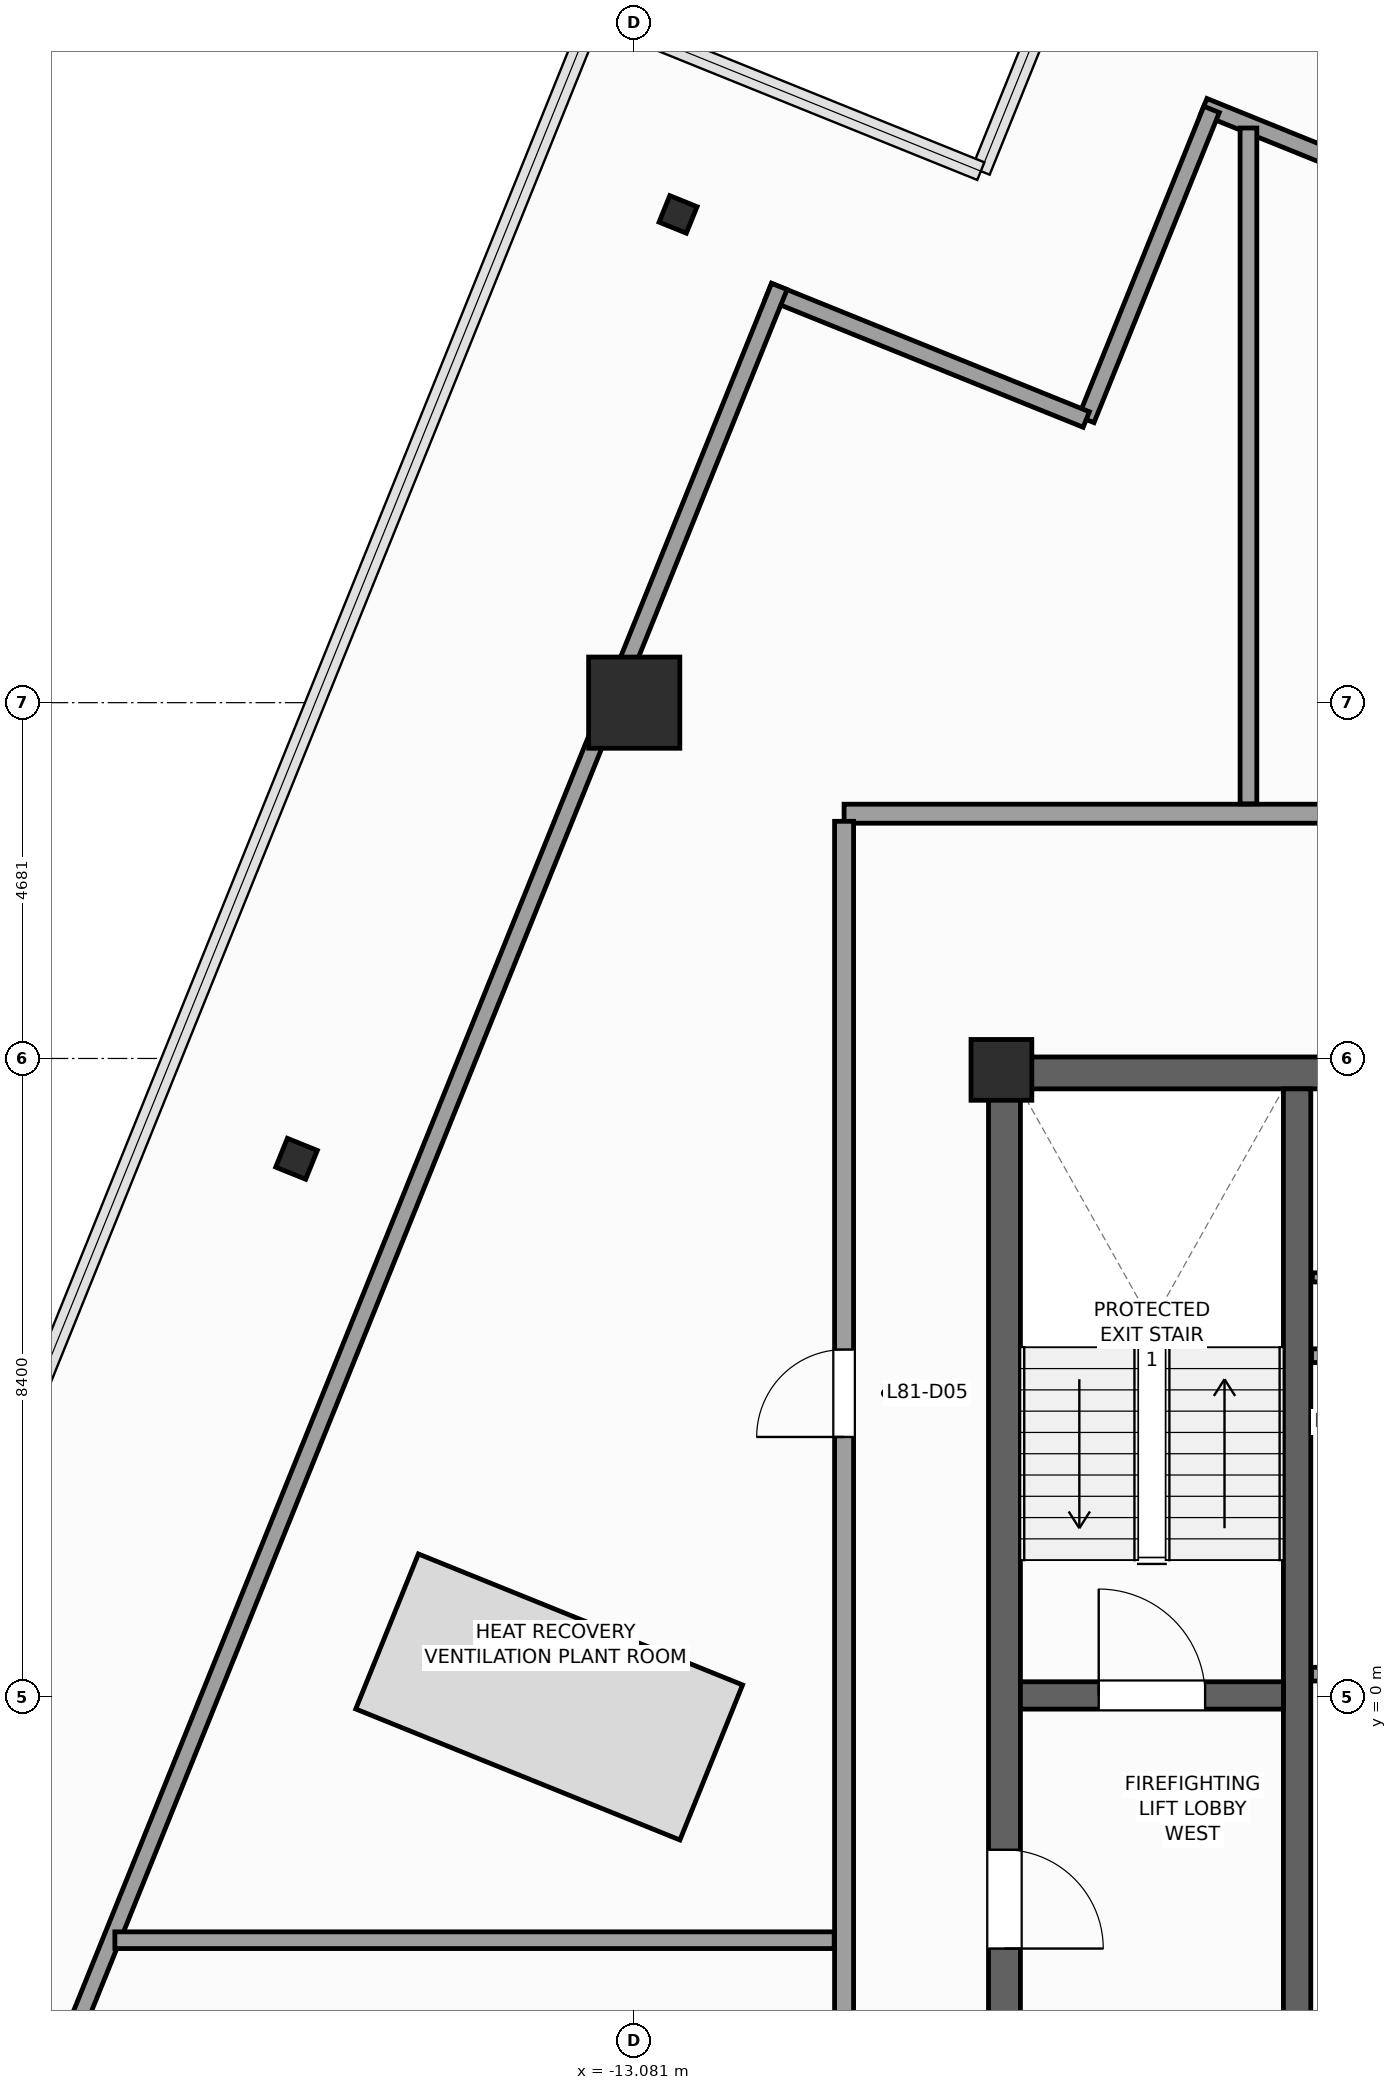
"""IFC4 building model, lengths in metres.
Left out: names, types, materials, properties, quantities, classifications, styles, units other than length and angle.
Written with IfcOpenShell. Run it as: python <this file> out.ifc"""

import sys

from ifc_helpers import new_model, si_unit, direction, frame, frame_2d, origin, origin_2d, place, context, subcontext, project, spatial, rectangle, i_section, extrude, source, transform, mapped, element, fill, save


model = new_model("IFC4")
c1 = context("Model", 3, precision=1e-05, world=origin(), true_north=direction((0.0, 1.0)))
c2 = subcontext(c1, "Body", "Model", "MODEL_VIEW")
j1 = project(units=[si_unit("LENGTHUNIT", "METRE"), si_unit("PLANEANGLEUNIT", "RADIAN")], contexts=[c1])
p1 = place(None, origin())
s1 = spatial("IfcSite", under=j1, at=p1, CompositionType="ELEMENT")
p2 = place(p1, origin())
s2 = spatial("IfcBuilding", under=s1, at=p2, CompositionType="ELEMENT")
p3 = place(p2, frame((0.0, 0.0, 329.6)))
s3 = spatial("IfcBuildingStorey", under=s2, at=p3, CompositionType="ELEMENT", Elevation=329.6)
p4 = place(p3, frame((-8.42, 8.21, 0.0), z_axis=(0.0, 0.0, 1.0), x_axis=(1.0, 0.0, 0.0)))
e1 = element("IfcWall", 1, at=p4, inside=s3, PredefinedType="SHEAR", context=c2, shape_type="SweptSolid", body=[
    extrude(rectangle(XDim=16.84, YDim=0.42, at=frame_2d((8.42, 0.0))), origin(), (0.0, 0.0, 1.0), 4.0),
])
p5 = place(p3, frame((-8.21, -8.0, 0.0), z_axis=(0.0, 0.0, 1.0), x_axis=(0.0, 1.0, 0.0)))
e2 = element("IfcWall", 2, at=p5, inside=s3, PredefinedType="SHEAR", context=c2, shape_type="SweptSolid", body=[
    extrude(rectangle(XDim=16.0, YDim=0.42, at=frame_2d((8.0, 0.0))), origin(), (0.0, 0.0, 1.0), 4.0),
])
p6 = place(p5, frame((4.69, 0.0, 0.0)))
e3 = element("IfcOpeningElement", 3, at=p6, cuts=e2, PredefinedType="OPENING", context=c2, shape_type="SweptSolid", body=[
    extrude(rectangle(XDim=1.3, YDim=2.2, at=frame_2d((0.65, 1.1))), frame((0.0, 0.22, 0.0), z_axis=(0.0, -1.0, 0.0), x_axis=(1.0, 0.0, 0.0)), (0.0, 0.0, 1.0), 0.44),
])
p7 = place(p3, frame((-4.36, -8.0, 0.0), z_axis=(0.0, 0.0, 1.0), x_axis=(0.0, 1.0, 0.0)))
e4 = element("IfcWall", 4, at=p7, inside=s3, PredefinedType="SHEAR", context=c2, shape_type="SweptSolid", body=[
    extrude(rectangle(XDim=16.0, YDim=0.36, at=frame_2d((8.0, 0.0))), origin(), (0.0, 0.0, 1.0), 4.0),
])
p8 = place(p3, frame((-8.0, 0.02, 0.0), z_axis=(0.0, 0.0, 1.0), x_axis=(1.0, 0.0, 0.0)))
e5 = element("IfcWall", 5, at=p8, inside=s3, PredefinedType="SHEAR", context=c2, shape_type="SweptSolid", body=[
    extrude(rectangle(XDim=3.46, YDim=0.36, at=frame_2d((1.73, 0.0))), origin(), (0.0, 0.0, 1.0), 4.0),
])
p9 = place(p8, frame((1.03, 0.0, 0.0)))
e6 = element("IfcOpeningElement", 6, at=p9, cuts=e5, PredefinedType="OPENING", context=c2, shape_type="SweptSolid", body=[
    extrude(rectangle(XDim=1.4, YDim=2.2, at=frame_2d((0.7, 1.1))), frame((0.0, 0.19, 0.0), z_axis=(0.0, -1.0, 0.0), x_axis=(1.0, 0.0, 0.0)), (0.0, 0.0, 1.0), 0.38),
])
m1 = source(origin(), c2, "Body", "SweptSolid", [
    extrude(rectangle(XDim=0.8, YDim=0.8, at=origin_2d()), origin(), (0.0, 0.0, 1.0), 4.0),
])
p10 = place(p3, frame((-8.25, 8.25, 0.0), z_axis=(0.0, 0.0, 1.0), x_axis=(1.0, 0.0, 0.0)))
e7 = element("IfcColumn", 7, at=p10, inside=s3, PredefinedType="PILASTER", context=c2, shape_type="MappedRepresentation", body=[
    mapped(m1, transform((0.0, 0.0, 0.0), scale=1.0)),
])
m2 = source(origin(), c2, "Body", "SweptSolid", [
    extrude(rectangle(XDim=1.2, YDim=1.2, at=origin_2d()), origin(), (0.0, 0.0, 1.0), 4.0),
])
p11 = place(p3, frame((-13.081, 13.081, 0.0), z_axis=(0.0, 0.0, 1.0), x_axis=(1.0, 0.0, 0.0)))
e8 = element("IfcColumn", 8, at=p11, inside=s3, PredefinedType="COLUMN", context=c2, shape_type="MappedRepresentation", body=[
    mapped(m2, transform((0.0, 0.0, 0.0), scale=1.0)),
])
m3 = source(origin(), c2, "Body", "SweptSolid", [
    extrude(i_section(OverallWidth=0.376, OverallDepth=0.387, WebThickness=0.02, FlangeThickness=0.032, FilletRadius=0.015, at=origin_2d()), origin(), (0.0, 0.0, 1.0), 4.0),
])
p12 = place(p3, frame((-12.504, 19.504, 0.0), z_axis=(0.0, 0.0, 1.0), x_axis=(0.374606593416, 0.927183854567, 0.0)))
e9 = element("IfcColumn", 9, at=p12, inside=s3, PredefinedType="COLUMN", context=c2, shape_type="MappedRepresentation", body=[
    mapped(m3, transform((0.0, 0.0, 0.0), scale=1.0)),
])
m4 = source(origin(), c2, "Body", "SweptSolid", [
    extrude(i_section(OverallWidth=0.409, OverallDepth=0.425, WebThickness=0.024, FlangeThickness=0.039, FilletRadius=0.015, at=origin_2d()), origin(), (0.0, 0.0, 1.0), 4.0),
])
p13 = place(p3, frame((-17.524, 7.08, 0.0), z_axis=(0.0, 0.0, 1.0), x_axis=(0.374606593416, 0.927183854567, 0.0)))
e10 = element("IfcColumn", 10, at=p13, inside=s3, PredefinedType="COLUMN", context=c2, shape_type="MappedRepresentation", body=[
    mapped(m4, transform((0.0, 0.0, 0.0), scale=1.0)),
])
for number, where, z_axis, x_axis in (
    (11, (-4.17, 0.3, 0.0), (0.0, 0.0, 1.0), (1.0, 0.0, 0.0)),
    (12, (-4.17, 4.49, 0.0), (0.0, 0.0, 1.0), (1.0, 0.0, 0.0)),
):
    element("IfcWall", number, at=place(p3, frame(where, z_axis=z_axis, x_axis=x_axis)), inside=s3, PredefinedType="PARTITIONING", context=c2, shape_type="SweptSolid", body=[
        extrude(rectangle(XDim=2.28, YDim=0.18, at=frame_2d((1.14, 0.0))), origin(), (0.0, 0.0, 1.0), 3.7),
    ])
p14 = place(p3, frame((-4.16, 5.52, 0.0), z_axis=(0.0, 0.0, 1.0), x_axis=(1.0, 0.0, 0.0)))
e13 = element("IfcWall", 13, at=p14, inside=s3, PredefinedType="PARTITIONING", context=c2, shape_type="SweptSolid", body=[
    extrude(rectangle(XDim=2.1, YDim=0.12, at=frame_2d((1.05, 0.0))), origin(), (0.0, 0.0, 1.0), 3.7),
])
p15 = place(p3, frame((18.556, 11.172, 0.0), z_axis=(0.0, 0.0, 1.0), x_axis=(-0.927181788521, 0.374611707018, 0.0)))
e14 = element("IfcWall", 14, at=p15, inside=s3, PredefinedType="PARTITIONING", context=c2, shape_type="SweptSolid", body=[
    extrude(rectangle(XDim=26.04, YDim=0.22, at=frame_2d((13.02, 0.0))), origin(), (0.0, 0.0, 1.0), 3.05),
])
p16 = place(p3, frame((-5.486, 20.886, 0.0), z_axis=(0.0, 0.0, 1.0), x_axis=(-0.374593321469, -0.927189216671, 0.0)))
e15 = element("IfcWall", 15, at=p16, inside=s3, PredefinedType="PARTITIONING", context=c2, shape_type="SweptSolid", body=[
    extrude(rectangle(XDim=4.4, YDim=0.22, at=frame_2d((2.2, 0.0))), origin(), (0.0, 0.0, 1.0), 3.7),
])
p17 = place(p3, frame((-7.134, 16.806, 0.0), z_axis=(0.0, 0.0, 1.0), x_axis=(-0.927186885331, 0.374599091925, 0.0)))
e16 = element("IfcWall", 16, at=p17, inside=s3, PredefinedType="PARTITIONING", context=c2, shape_type="SweptSolid", body=[
    extrude(rectangle(XDim=4.51, YDim=0.22, at=frame_2d((2.255, 0.0))), origin(), (0.0, 0.0, 1.0), 3.7),
])
p18 = place(p3, frame((-11.172, 18.556, 0.0), z_axis=(0.0, 0.0, 1.0), x_axis=(-0.374611707018, -0.927181788521, 0.0)))
e17 = element("IfcWall", 17, at=p18, inside=s3, PredefinedType="PARTITIONING", context=c2, shape_type="SweptSolid", body=[
    extrude(rectangle(XDim=26.04, YDim=0.22, at=frame_2d((13.02, 0.0))), origin(), (0.0, 0.0, 1.0), 3.05),
])
p19 = place(p3, frame((-10.32, 11.62, 0.0), z_axis=(0.0, 0.0, 1.0), x_axis=(1.0, 0.0, 0.0)))
e18 = element("IfcWall", 18, at=p19, inside=s3, PredefinedType="PARTITIONING", context=c2, shape_type="SweptSolid", body=[
    extrude(rectangle(XDim=21.94, YDim=0.25, at=frame_2d((10.97, 0.0))), origin(), (0.0, 0.0, 1.0), 3.7),
])
p20 = place(p19, frame((9.745, 0.0, 0.0)))
e19 = element("IfcOpeningElement", 19, at=p20, cuts=e18, PredefinedType="OPENING", context=c2, shape_type="SweptSolid", body=[
    extrude(rectangle(XDim=1.15, YDim=2.25, at=frame_2d((0.575, 1.125))), frame((0.0, 0.135, 0.0), z_axis=(0.0, -1.0, 0.0), x_axis=(1.0, 0.0, 0.0)), (0.0, 0.0, 1.0), 0.27),
])
p21 = place(p3, frame((-10.32, -10.22, 0.0), z_axis=(0.0, 0.0, 1.0), x_axis=(0.0, 1.0, 0.0)))
e20 = element("IfcWall", 20, at=p21, inside=s3, PredefinedType="PARTITIONING", context=c2, shape_type="SweptSolid", body=[
    extrude(rectangle(XDim=21.74, YDim=0.25, at=frame_2d((10.87, 0.0))), origin(), (0.0, 0.0, 1.0), 3.7),
])
p22 = place(p21, frame((13.641, 0.0, 0.0)))
e21 = element("IfcOpeningElement", 21, at=p22, cuts=e20, PredefinedType="OPENING", context=c2, shape_type="SweptSolid", body=[
    extrude(rectangle(XDim=1.15, YDim=2.25, at=frame_2d((0.575, 1.125))), frame((0.0, 0.135, 0.0), z_axis=(0.0, -1.0, 0.0), x_axis=(1.0, 0.0, 0.0)), (0.0, 0.0, 1.0), 0.27),
])
p23 = place(p3, frame((-5.0, 11.75, 0.0), z_axis=(0.0, 0.0, 1.0), x_axis=(0.0, 1.0, 0.0)))
e22 = element("IfcWall", 22, at=p23, inside=s3, PredefinedType="PARTITIONING", context=c2, shape_type="SweptSolid", body=[
    extrude(rectangle(XDim=8.891, YDim=0.22, at=frame_2d((4.446, 0.0))), origin(), (0.0, 0.0, 1.0), 3.7),
])
p24 = place(p3, frame((-10.45, -3.2, 0.0), z_axis=(0.0, 0.0, 1.0), x_axis=(-1.0, 0.0, 0.0)))
e23 = element("IfcWall", 23, at=p24, inside=s3, PredefinedType="PARTITIONING", context=c2, shape_type="SweptSolid", body=[
    extrude(rectangle(XDim=9.464, YDim=0.22, at=frame_2d((4.732, 0.0))), origin(), (0.0, 0.0, 1.0), 3.7),
])
m5 = source(origin(), c2, "Body", "SweptSolid", [
    extrude(rectangle(XDim=1.4, YDim=2.2, at=frame_2d((0.7, 1.1))), frame((0.0, 0.025, 0.0), z_axis=(0.0, -1.0, 0.0), x_axis=(1.0, 0.0, 0.0)), (0.0, 0.0, 1.0), 0.05),
])
p25 = place(p9, origin())
e24 = element("IfcDoor", 24, at=p25, inside=s3, OperationType="SINGLE_SWING_LEFT", PredefinedType="DOOR", context=c2, shape_type="MappedRepresentation", body=[
    mapped(m5, transform((0.0, 0.0, 0.0), scale=1.0)),
])
fill(e6, e24)
m6 = source(origin(), c2, "Body", "SweptSolid", [
    extrude(rectangle(XDim=1.3, YDim=2.2, at=frame_2d((0.65, 1.1))), frame((0.0, 0.025, 0.0), z_axis=(0.0, -1.0, 0.0), x_axis=(1.0, 0.0, 0.0)), (0.0, 0.0, 1.0), 0.05),
])
p26 = place(p6, frame((1.3, 0.0, 0.0), z_axis=(0.0, 0.0, 1.0), x_axis=(-1.0, 0.0, 0.0)))
e25 = element("IfcDoor", 25, at=p26, inside=s3, OperationType="SINGLE_SWING_LEFT", PredefinedType="DOOR", context=c2, shape_type="MappedRepresentation", body=[
    mapped(m6, transform((0.0, 0.0, 0.0), scale=1.0)),
])
fill(e3, e25)
m7 = source(origin(), c2, "Body", "SweptSolid", [
    extrude(rectangle(XDim=1.15, YDim=2.25, at=frame_2d((0.575, 1.125))), frame((0.0, 0.025, 0.0), z_axis=(0.0, -1.0, 0.0), x_axis=(1.0, 0.0, 0.0)), (0.0, 0.0, 1.0), 0.05),
])
p27 = place(p22, origin())
e26 = element("IfcDoor", 26, at=p27, inside=s3, OperationType="SINGLE_SWING_LEFT", PredefinedType="DOOR", context=c2, shape_type="MappedRepresentation", body=[
    mapped(m7, transform((0.0, 0.0, 0.0), scale=1.0)),
])
fill(e21, e26)
save(model, sys.argv[1])
